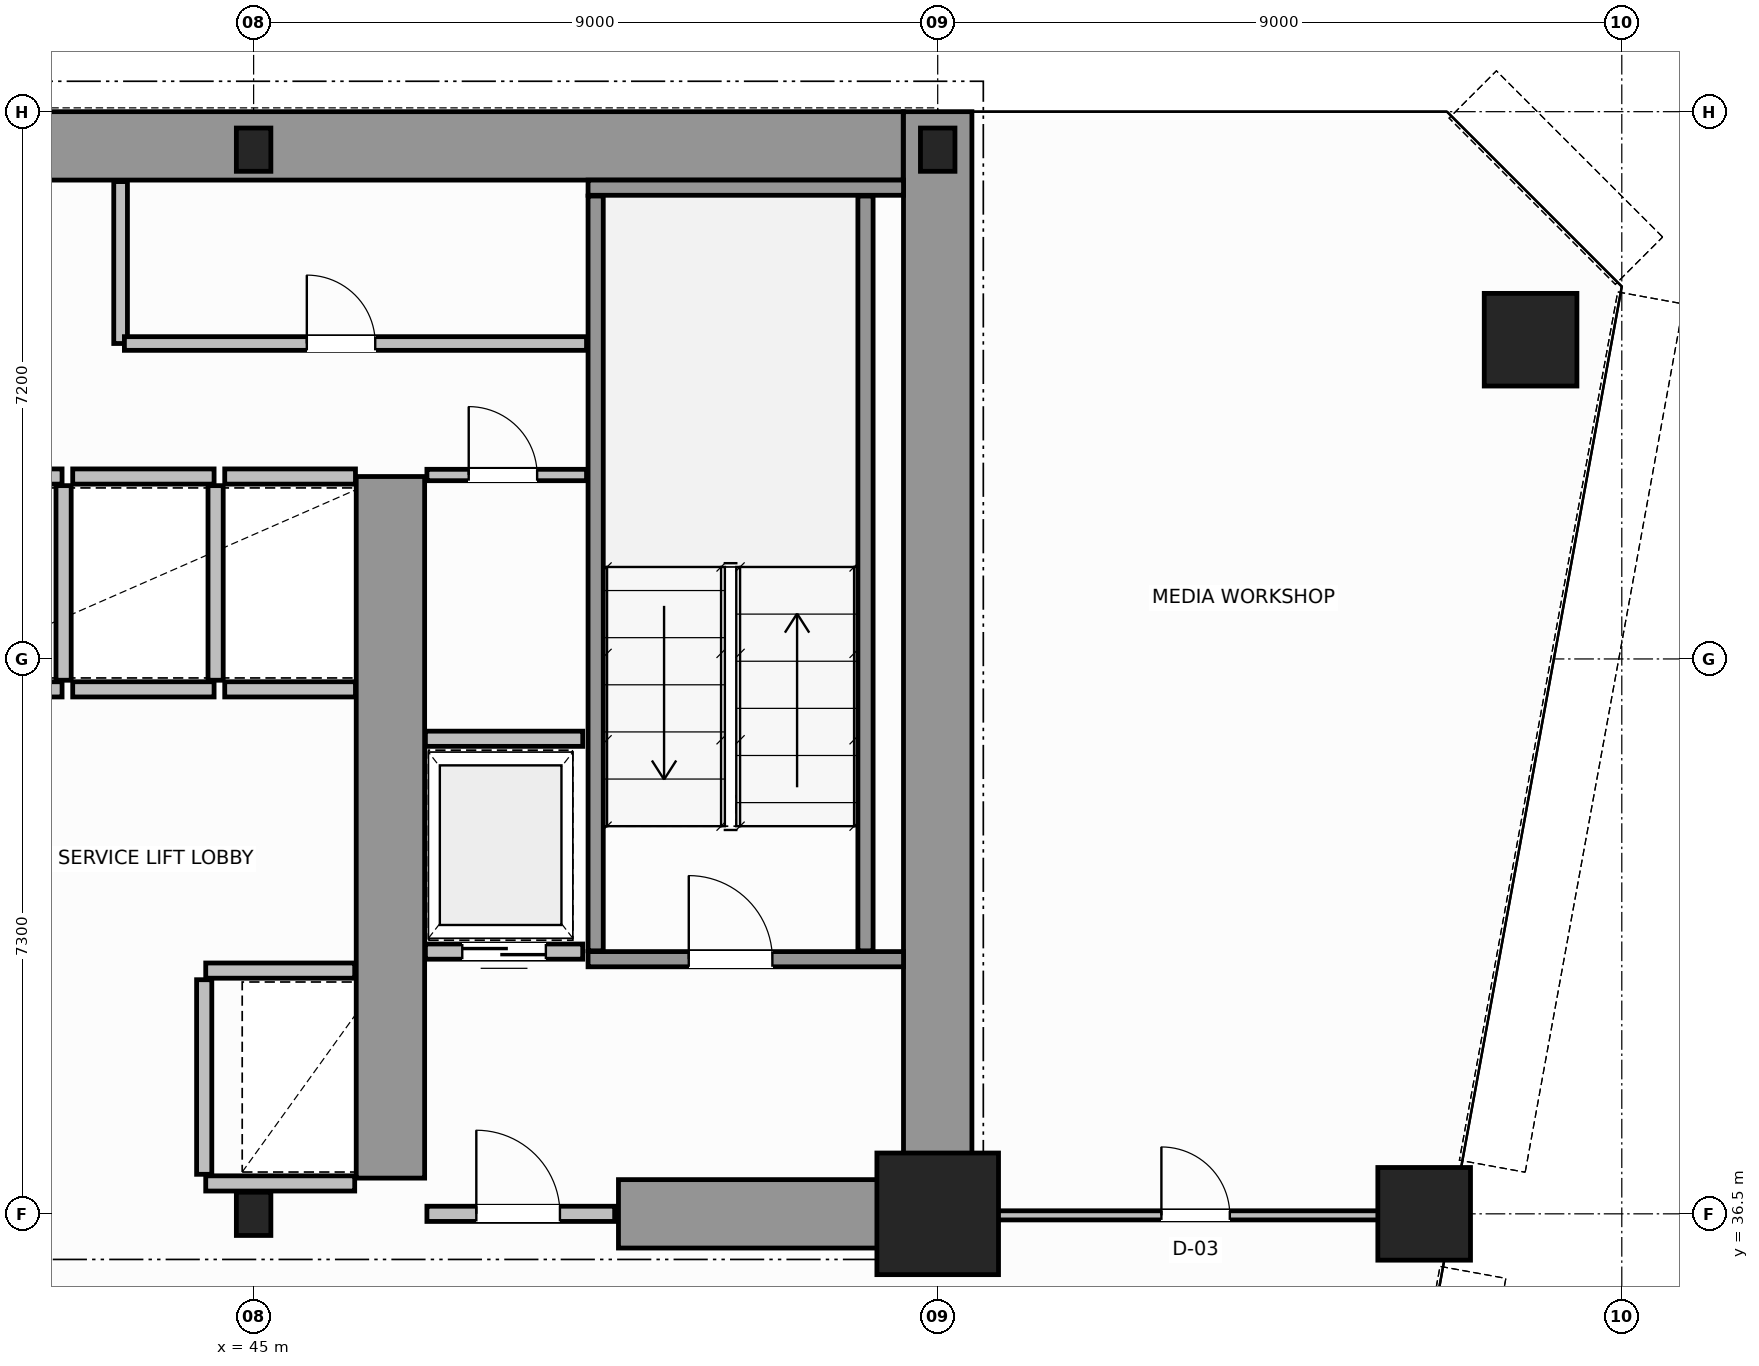
"""IFC4 building model, lengths in metres.
Left out: names, types, materials, properties, quantities, classifications, styles, units other than length and angle.
Written with IfcOpenShell. Run it as: python <this file> out.ifc"""

import sys

from ifc_helpers import new_model, si_unit, direction, frame, frame_2d, origin, origin_2d, place, context, subcontext, project, spatial, rectangle, hollow_circle, i_section, extrude, source, transform, mapped, element, fill, save


model = new_model("IFC4")
c1 = context("Model", 3, precision=1e-05, world=origin(), true_north=direction((0.0, 1.0)))
c2 = subcontext(c1, "Body", "Model", "MODEL_VIEW")
j1 = project(units=[si_unit("LENGTHUNIT", "METRE"), si_unit("PLANEANGLEUNIT", "RADIAN")], contexts=[c1])
p1 = place(None, origin())
s1 = spatial("IfcSite", under=j1, at=p1, CompositionType="ELEMENT")
p2 = place(p1, origin())
s2 = spatial("IfcBuilding", under=s1, at=p2, CompositionType="ELEMENT")
p3 = place(p2, frame((0.0, 0.0, 60.6)))
s3 = spatial("IfcBuildingStorey", under=s2, at=p3, CompositionType="ELEMENT", Elevation=60.6)
m1 = source(origin(), c2, "Body", "SweptSolid", [
    extrude(i_section(OverallWidth=0.454, OverallDepth=0.569, WebThickness=0.078, FlangeThickness=0.08, FilletRadius=0.015, at=origin_2d()), origin(), (0.0, 0.0, 1.0), 3.8),
])
p4 = place(p3, frame((45.0, 36.5, 0.0), z_axis=(0.0, 0.0, 1.0), x_axis=(1.0, 0.0, 0.0)))
e1 = element("IfcColumn", 1, at=p4, inside=s3, PredefinedType="COLUMN", context=c2, shape_type="MappedRepresentation", body=[
    mapped(m1, transform((0.0, 0.0, 0.0), scale=1.0)),
])
m2 = source(origin(), c2, "Body", "SweptSolid", [
    extrude(rectangle(XDim=1.6, YDim=1.6, at=origin_2d()), origin(), (0.0, 0.0, 1.0), 3.8),
])
p5 = place(p3, frame((54.0, 36.5, 0.0), z_axis=(0.0, 0.0, 1.0), x_axis=(1.0, 0.0, 0.0)))
e2 = element("IfcColumn", 2, at=p5, inside=s3, PredefinedType="COLUMN", context=c2, shape_type="MappedRepresentation", body=[
    mapped(m2, transform((0.0, 0.0, 0.0), scale=1.0)),
])
for number, where, z_axis, x_axis in (
    (3, (45.0, 50.5, 0.0), (0.0, 0.0, 1.0), (1.0, 0.0, 0.0)),
    (4, (54.0, 50.5, 0.0), (0.0, 0.0, 1.0), (1.0, 0.0, 0.0)),
):
    element("IfcColumn", number, at=place(p3, frame(where, z_axis=z_axis, x_axis=x_axis)), inside=s3, PredefinedType="COLUMN", context=c2, shape_type="MappedRepresentation", body=[
        mapped(m1, transform((0.0, 0.0, 0.0), scale=1.0)),
    ])
m3 = source(origin(), c2, "Body", "SweptSolid", [
    extrude(hollow_circle(Radius=0.61, WallThickness=0.05, at=origin_2d()), origin(), (0.0, 0.0, 1.0), 3.8),
])
for number, where, z_axis, x_axis in (
    (5, (61.8, 48.0, 0.0), (0.0, 0.0, 1.0), (1.0, 0.0, 0.0)),
    (6, (60.4, 36.5, 0.0), (0.0, 0.0, 1.0), (1.0, 0.0, 0.0)),
):
    element("IfcColumn", number, at=place(p3, frame(where, z_axis=z_axis, x_axis=x_axis)), inside=s3, PredefinedType="COLUMN", context=c2, shape_type="MappedRepresentation", body=[
        mapped(m3, transform((0.0, 0.0, 0.0), scale=1.0)),
    ])
p6 = place(p3, frame((34.002, 50.55, 0.0), z_axis=(0.0, 0.0, 1.0), x_axis=(1.0, 0.0, 0.0)))
e7 = element("IfcWall", 7, at=p6, inside=s3, PredefinedType="SHEAR", context=c2, shape_type="SweptSolid", body=[
    extrude(rectangle(XDim=19.544, YDim=0.9, at=frame_2d((9.772, 0.0))), origin(), (0.0, 0.0, 1.0), 3.8),
])
p7 = place(p3, frame((54.0, 36.5, 0.0), z_axis=(0.0, 0.0, 1.0), x_axis=(0.0, 1.0, 0.0)))
e8 = element("IfcWall", 8, at=p7, inside=s3, PredefinedType="SHEAR", context=c2, shape_type="SweptSolid", body=[
    extrude(rectangle(XDim=14.5, YDim=0.9, at=frame_2d((7.25, 0.0))), origin(), (0.0, 0.0, 1.0), 3.8),
])
p8 = place(p3, frame((49.8, 36.5, 0.0), z_axis=(0.0, 0.0, 1.0), x_axis=(1.0, 0.0, 0.0)))
e9 = element("IfcWall", 9, at=p8, inside=s3, PredefinedType="SHEAR", context=c2, shape_type="SweptSolid", body=[
    extrude(rectangle(XDim=3.73, YDim=0.9, at=frame_2d((1.865, 0.0))), origin(), (0.0, 0.0, 1.0), 2.38),
])
p9 = place(p3, frame((46.8, 36.97, 0.0), z_axis=(0.0, 0.0, 1.0), x_axis=(0.0, 1.0, 0.0)))
e10 = element("IfcWall", 10, at=p9, inside=s3, PredefinedType="SHEAR", context=c2, shape_type="SweptSolid", body=[
    extrude(rectangle(XDim=9.23, YDim=0.9, at=frame_2d((4.615, 0.0))), origin(), (0.0, 0.0, 1.0), 3.8),
])
p10 = place(p3, frame((49.4, 39.85, 0.0), z_axis=(0.0, 0.0, 1.0), x_axis=(1.0, 0.0, 0.0)))
e11 = element("IfcWall", 11, at=p10, inside=s3, PredefinedType="SOLIDWALL", context=c2, shape_type="SweptSolid", body=[
    extrude(rectangle(XDim=4.15, YDim=0.2, at=frame_2d((2.075, 0.0))), origin(), (0.0, 0.0, 1.0), 3.8),
])
p11 = place(p10, frame((1.325, 0.0, 0.0)))
e12 = element("IfcOpeningElement", 12, at=p11, cuts=e11, PredefinedType="OPENING", context=c2, shape_type="SweptSolid", body=[
    extrude(rectangle(XDim=1.1, YDim=2.15, at=frame_2d((0.55, 1.075))), frame((0.0, 0.11, 0.0), z_axis=(0.0, -1.0, 0.0), x_axis=(1.0, 0.0, 0.0)), (0.0, 0.0, 1.0), 0.22),
])
p12 = place(p3, frame((49.4, 50.0, 0.0), z_axis=(0.0, 0.0, 1.0), x_axis=(1.0, 0.0, 0.0)))
e13 = element("IfcWall", 13, at=p12, inside=s3, PredefinedType="SOLIDWALL", context=c2, shape_type="SweptSolid", body=[
    extrude(rectangle(XDim=4.15, YDim=0.2, at=frame_2d((2.075, 0.0))), origin(), (0.0, 0.0, 1.0), 3.8),
])
for number, where, z_axis, x_axis in (
    (14, (49.5, 39.96, 0.0), (0.0, 0.0, 1.0), (0.0, 1.0, 0.0)),
    (15, (53.05, 39.96, 0.0), (0.0, 0.0, 1.0), (0.0, 1.0, 0.0)),
):
    element("IfcWall", number, at=place(p3, frame(where, z_axis=z_axis, x_axis=x_axis)), inside=s3, PredefinedType="SOLIDWALL", context=c2, shape_type="SweptSolid", body=[
        extrude(rectangle(XDim=9.93, YDim=0.2, at=frame_2d((4.965, 0.0))), origin(), (0.0, 0.0, 1.0), 3.8),
    ])
p13 = place(p3, frame((47.28, 36.5, 0.0), z_axis=(0.0, 0.0, 1.0), x_axis=(1.0, 0.0, 0.0)))
e16 = element("IfcWall", 16, at=p13, inside=s3, PredefinedType="SOLIDWALL", context=c2, shape_type="SweptSolid", body=[
    extrude(rectangle(XDim=2.47, YDim=0.2, at=frame_2d((1.235, 0.0))), origin(), (0.0, 0.0, 1.0), 2.37),
])
p14 = place(p13, frame((0.65, 0.0, 0.0)))
e17 = element("IfcOpeningElement", 17, at=p14, cuts=e16, PredefinedType="OPENING", context=c2, shape_type="SweptSolid", body=[
    extrude(rectangle(XDim=1.1, YDim=2.15, at=frame_2d((0.55, 1.075))), frame((0.0, 0.11, 0.0), z_axis=(0.0, -1.0, 0.0), x_axis=(1.0, 0.0, 0.0)), (0.0, 0.0, 1.0), 0.22),
])
p15 = place(p3, frame((44.37, 39.7, 0.0), z_axis=(0.0, 0.0, 1.0), x_axis=(1.0, 0.0, 0.0)))
e18 = element("IfcWall", 18, at=p15, inside=s3, PredefinedType="SOLIDWALL", context=c2, shape_type="SweptSolid", body=[
    extrude(rectangle(XDim=1.96, YDim=0.2, at=frame_2d((0.98, 0.0))), origin(), (0.0, 0.0, 1.0), 3.58),
])
p16 = place(p3, frame((44.37, 36.9, 0.0), z_axis=(0.0, 0.0, 1.0), x_axis=(1.0, 0.0, 0.0)))
e19 = element("IfcWall", 19, at=p16, inside=s3, PredefinedType="SOLIDWALL", context=c2, shape_type="SweptSolid", body=[
    extrude(rectangle(XDim=1.96, YDim=0.2, at=frame_2d((0.98, 0.0))), origin(), (0.0, 0.0, 1.0), 2.37),
])
p17 = place(p3, frame((44.35, 37.02, 0.0), z_axis=(0.0, 0.0, 1.0), x_axis=(0.0, 1.0, 0.0)))
e20 = element("IfcWall", 20, at=p17, inside=s3, PredefinedType="SOLIDWALL", context=c2, shape_type="SweptSolid", body=[
    extrude(rectangle(XDim=2.56, YDim=0.2, at=frame_2d((1.28, 0.0))), origin(), (0.0, 0.0, 1.0), 3.58),
])
for number, where, z_axis, x_axis in (
    (21, (40.62, 43.4, 0.0), (0.0, 0.0, 1.0), (1.0, 0.0, 0.0)),
    (22, (40.62, 46.2, 0.0), (0.0, 0.0, 1.0), (1.0, 0.0, 0.0)),
):
    element("IfcWall", number, at=place(p3, frame(where, z_axis=z_axis, x_axis=x_axis)), inside=s3, PredefinedType="SOLIDWALL", context=c2, shape_type="SweptSolid", body=[
        extrude(rectangle(XDim=1.86, YDim=0.2, at=frame_2d((0.93, 0.0))), origin(), (0.0, 0.0, 1.0), 3.58),
    ])
p18 = place(p3, frame((42.5, 43.52, 0.0), z_axis=(0.0, 0.0, 1.0), x_axis=(0.0, 1.0, 0.0)))
e23 = element("IfcWall", 23, at=p18, inside=s3, PredefinedType="SOLIDWALL", context=c2, shape_type="SweptSolid", body=[
    extrude(rectangle(XDim=2.56, YDim=0.2, at=frame_2d((1.28, 0.0))), origin(), (0.0, 0.0, 1.0), 3.58),
])
for number, where, z_axis, x_axis in (
    (24, (42.62, 43.4, 0.0), (0.0, 0.0, 1.0), (1.0, 0.0, 0.0)),
    (25, (42.62, 46.2, 0.0), (0.0, 0.0, 1.0), (1.0, 0.0, 0.0)),
):
    element("IfcWall", number, at=place(p3, frame(where, z_axis=z_axis, x_axis=x_axis)), inside=s3, PredefinedType="SOLIDWALL", context=c2, shape_type="SweptSolid", body=[
        extrude(rectangle(XDim=1.86, YDim=0.2, at=frame_2d((0.93, 0.0))), origin(), (0.0, 0.0, 1.0), 3.58),
    ])
p19 = place(p3, frame((44.5, 43.52, 0.0), z_axis=(0.0, 0.0, 1.0), x_axis=(0.0, 1.0, 0.0)))
e26 = element("IfcWall", 26, at=p19, inside=s3, PredefinedType="SOLIDWALL", context=c2, shape_type="SweptSolid", body=[
    extrude(rectangle(XDim=2.56, YDim=0.2, at=frame_2d((1.28, 0.0))), origin(), (0.0, 0.0, 1.0), 3.58),
])
for number, where, z_axis, x_axis in (
    (27, (44.62, 43.4, 0.0), (0.0, 0.0, 1.0), (1.0, 0.0, 0.0)),
    (28, (44.62, 46.2, 0.0), (0.0, 0.0, 1.0), (1.0, 0.0, 0.0)),
):
    element("IfcWall", number, at=place(p3, frame(where, z_axis=z_axis, x_axis=x_axis)), inside=s3, PredefinedType="SOLIDWALL", context=c2, shape_type="SweptSolid", body=[
        extrude(rectangle(XDim=1.72, YDim=0.2, at=frame_2d((0.86, 0.0))), origin(), (0.0, 0.0, 1.0), 3.58),
    ])
p20 = place(p3, frame((47.26, 39.95, 0.0), z_axis=(0.0, 0.0, 1.0), x_axis=(1.0, 0.0, 0.0)))
e29 = element("IfcWall", 29, at=p20, inside=s3, PredefinedType="SOLIDWALL", context=c2, shape_type="SweptSolid", body=[
    extrude(rectangle(XDim=2.07, YDim=0.2, at=frame_2d((1.035, 0.0))), origin(), (0.0, 0.0, 1.0), 3.58),
])
p21 = place(p20, frame((0.485, 0.0, 0.0)))
e30 = element("IfcOpeningElement", 30, at=p21, cuts=e29, PredefinedType="OPENING", context=c2, shape_type="SweptSolid", body=[
    extrude(rectangle(XDim=1.1, YDim=2.15, at=frame_2d((0.55, 1.075))), frame((0.0, 0.11, 0.0), z_axis=(0.0, -1.0, 0.0), x_axis=(1.0, 0.0, 0.0)), (0.0, 0.0, 1.0), 0.22),
])
p22 = place(p3, frame((47.26, 42.75, 0.0), z_axis=(0.0, 0.0, 1.0), x_axis=(1.0, 0.0, 0.0)))
e31 = element("IfcWall", 31, at=p22, inside=s3, PredefinedType="SOLIDWALL", context=c2, shape_type="SweptSolid", body=[
    extrude(rectangle(XDim=2.07, YDim=0.2, at=frame_2d((1.035, 0.0))), origin(), (0.0, 0.0, 1.0), 3.58),
])
p23 = place(p3, frame((47.28, 46.22, 0.0), z_axis=(0.0, 0.0, 1.0), x_axis=(1.0, 0.0, 0.0)))
e32 = element("IfcWall", 32, at=p23, inside=s3, PredefinedType="PARTITIONING", context=c2, shape_type="SweptSolid", body=[
    extrude(rectangle(XDim=2.1, YDim=0.15, at=frame_2d((1.05, 0.0))), origin(), (0.0, 0.0, 1.0), 3.58),
])
p24 = place(p23, frame((0.55, 0.0, 0.0)))
e33 = element("IfcOpeningElement", 33, at=p24, cuts=e32, PredefinedType="OPENING", context=c2, shape_type="SweptSolid", body=[
    extrude(rectangle(XDim=0.9, YDim=2.1, at=frame_2d((0.45, 1.05))), frame((0.0, 0.085, 0.0), z_axis=(0.0, -1.0, 0.0), x_axis=(1.0, 0.0, 0.0)), (0.0, 0.0, 1.0), 0.17),
])
p25 = place(p3, frame((43.25, 47.95, 0.0), z_axis=(0.0, 0.0, 1.0), x_axis=(0.0, 1.0, 0.0)))
e34 = element("IfcWall", 34, at=p25, inside=s3, PredefinedType="PLUMBINGWALL", context=c2, shape_type="SweptSolid", body=[
    extrude(rectangle(XDim=2.13, YDim=0.18, at=frame_2d((1.065, 0.0))), origin(), (0.0, 0.0, 1.0), 3.58),
])
p26 = place(p3, frame((43.3, 47.95, 0.0), z_axis=(0.0, 0.0, 1.0), x_axis=(1.0, 0.0, 0.0)))
e35 = element("IfcWall", 35, at=p26, inside=s3, PredefinedType="PLUMBINGWALL", context=c2, shape_type="SweptSolid", body=[
    extrude(rectangle(XDim=6.08, YDim=0.18, at=frame_2d((3.04, 0.0))), origin(), (0.0, 0.0, 1.0), 3.58),
])
p27 = place(p26, frame((2.4, 0.0, 0.0)))
e36 = element("IfcOpeningElement", 36, at=p27, cuts=e35, PredefinedType="OPENING", context=c2, shape_type="SweptSolid", body=[
    extrude(rectangle(XDim=0.9, YDim=2.15, at=frame_2d((0.45, 1.075))), frame((0.0, 0.1, 0.0), z_axis=(0.0, -1.0, 0.0), x_axis=(1.0, 0.0, 0.0)), (0.0, 0.0, 1.0), 0.2),
])
p28 = place(p3, frame((54.06, 36.48, 0.0), z_axis=(0.0, 0.0, 1.0), x_axis=(1.0, 0.0, 0.0)))
e37 = element("IfcWall", 37, at=p28, inside=s3, PredefinedType="PARTITIONING", context=c2, shape_type="SweptSolid", body=[
    extrude(rectangle(XDim=6.666, YDim=0.12, at=frame_2d((3.333, 0.0))), origin(), (0.0, 0.0, 1.0), 2.77),
])
p29 = place(p28, frame((2.883, 0.0, 0.0)))
e38 = element("IfcOpeningElement", 38, at=p29, cuts=e37, PredefinedType="OPENING", context=c2, shape_type="SweptSolid", body=[
    extrude(rectangle(XDim=0.9, YDim=2.15, at=frame_2d((0.45, 1.075))), frame((0.0, 0.07, 0.0), z_axis=(0.0, -1.0, 0.0), x_axis=(1.0, 0.0, 0.0)), (0.0, 0.0, 1.0), 0.14),
])
m4 = source(origin(), c2, "Body", "SweptSolid", [
    extrude(rectangle(XDim=1.1, YDim=2.15, at=frame_2d((0.55, 1.075))), frame((0.0, 0.025, 0.0), z_axis=(0.0, -1.0, 0.0), x_axis=(1.0, 0.0, 0.0)), (0.0, 0.0, 1.0), 0.05),
])
p30 = place(p11, origin())
e39 = element("IfcDoor", 39, at=p30, inside=s3, OperationType="SINGLE_SWING_RIGHT", PredefinedType="DOOR", context=c2, shape_type="MappedRepresentation", body=[
    mapped(m4, transform((0.0, 0.0, 0.0), scale=1.0)),
])
fill(e12, e39)
p31 = place(p14, origin())
e40 = element("IfcDoor", 40, at=p31, inside=s3, OperationType="SINGLE_SWING_LEFT", PredefinedType="DOOR", context=c2, shape_type="MappedRepresentation", body=[
    mapped(m4, transform((0.0, 0.0, 0.0), scale=1.0)),
])
fill(e17, e40)
p32 = place(p21, origin())
e41 = element("IfcDoor", 41, at=p32, inside=s3, OperationType="DOUBLE_DOOR_SLIDING", PredefinedType="DOOR", context=c2, shape_type="MappedRepresentation", body=[
    mapped(m4, transform((0.0, 0.0, 0.0), scale=1.0)),
])
fill(e30, e41)
m5 = source(origin(), c2, "Body", "SweptSolid", [
    extrude(rectangle(XDim=0.9, YDim=2.1, at=frame_2d((0.45, 1.05))), frame((0.0, 0.025, 0.0), z_axis=(0.0, -1.0, 0.0), x_axis=(1.0, 0.0, 0.0)), (0.0, 0.0, 1.0), 0.05),
])
p33 = place(p24, origin())
e42 = element("IfcDoor", 42, at=p33, inside=s3, OperationType="SINGLE_SWING_RIGHT", PredefinedType="DOOR", context=c2, shape_type="MappedRepresentation", body=[
    mapped(m5, transform((0.0, 0.0, 0.0), scale=1.0)),
])
fill(e33, e42)
m6 = source(origin(), c2, "Body", "SweptSolid", [
    extrude(rectangle(XDim=0.9, YDim=2.15, at=frame_2d((0.45, 1.075))), frame((0.0, 0.025, 0.0), z_axis=(0.0, -1.0, 0.0), x_axis=(1.0, 0.0, 0.0)), (0.0, 0.0, 1.0), 0.05),
])
p34 = place(p27, origin())
e43 = element("IfcDoor", 43, at=p34, inside=s3, OperationType="SINGLE_SWING_RIGHT", PredefinedType="DOOR", context=c2, shape_type="MappedRepresentation", body=[
    mapped(m6, transform((0.0, 0.0, 0.0), scale=1.0)),
])
fill(e36, e43)
p35 = place(p29, origin())
e44 = element("IfcDoor", 44, at=p35, inside=s3, OperationType="SINGLE_SWING_RIGHT", PredefinedType="DOOR", context=c2, shape_type="MappedRepresentation", body=[
    mapped(m6, transform((0.0, 0.0, 0.0), scale=1.0)),
])
fill(e38, e44)
save(model, sys.argv[1])
